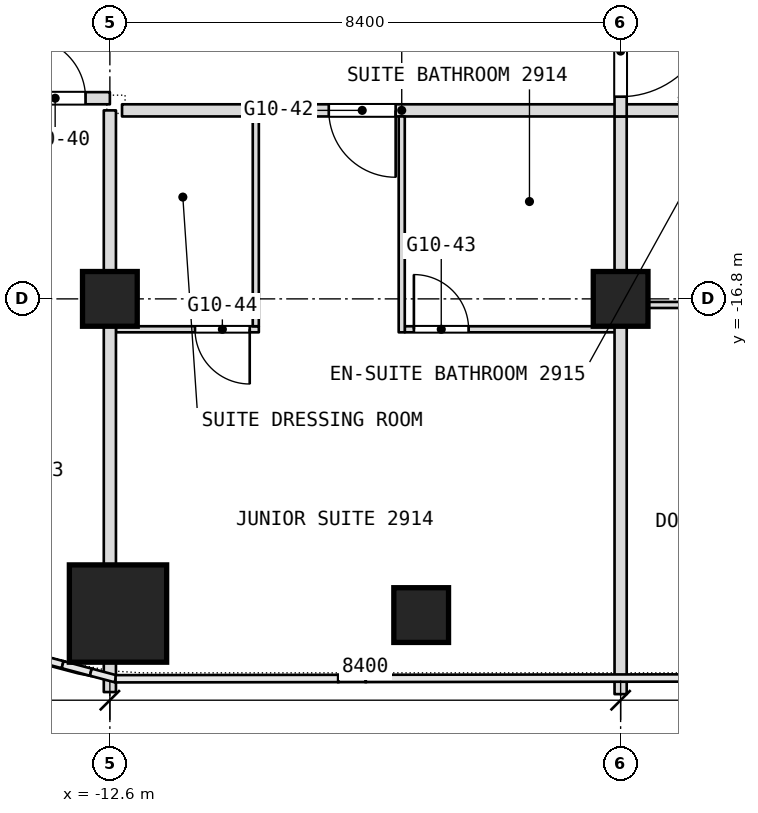
"""IFC4 building model, lengths in metres.
Left out: names, types, materials, properties, quantities, classifications, styles, units other than length and angle.
Written with IfcOpenShell. Run it as: python <this file> out.ifc"""

import sys

from ifc_helpers import new_model, si_unit, direction, frame, frame_2d, origin, origin_2d, place, context, subcontext, project, spatial, rectangle, extrude, element, fill, save


model = new_model("IFC4")
c1 = context("Model", 3, precision=1e-05, world=origin(), true_north=direction((0.0, 1.0)))
c2 = subcontext(c1, "Body", "Model", "MODEL_VIEW")
j1 = project(units=[si_unit("LENGTHUNIT", "METRE"), si_unit("PLANEANGLEUNIT", "RADIAN")], contexts=[c1])
p1 = place(None, origin())
s1 = spatial("IfcSite", under=j1, at=p1, CompositionType="ELEMENT")
p2 = place(p1, origin())
s2 = spatial("IfcBuilding", under=s1, at=p2, CompositionType="ELEMENT")
p3 = place(p2, frame((0.0, 0.0, 130.1)))
s3 = spatial("IfcBuildingStorey", under=s2, at=p3, CompositionType="ELEMENT", Elevation=130.1)
p4 = place(p3, frame((-12.466, -21.975, 0.0), z_axis=(0.0, 0.0, 1.0), x_axis=(1.0, 0.0, 0.0)))
e1 = element("IfcColumn", 1, at=p4, inside=s3, PredefinedType="COLUMN", context=c2, shape_type="SweptSolid", body=[
    extrude(rectangle(XDim=1.6, YDim=1.6, at=origin_2d()), origin(), (0.0, 0.0, 1.0), 3.6),
])
for number, where, z_axis, x_axis in (
    (2, (-12.6, -16.8, 0.0), (0.0, 0.0, 1.0), (1.0, 0.0, 0.0)),
    (3, (-4.2, -16.8, 0.0), (0.0, 0.0, 1.0), (1.0, 0.0, 0.0)),
    (4, (-7.48, -22.0, 0.0), (0.0, 0.0, 1.0), (1.0, 0.0, 0.0)),
):
    element("IfcColumn", number, at=place(p3, frame(where, z_axis=z_axis, x_axis=x_axis)), inside=s3, PredefinedType="COLUMN", context=c2, shape_type="SweptSolid", body=[
        extrude(rectangle(XDim=0.9, YDim=0.9, at=origin_2d()), origin(), (0.0, 0.0, 1.0), 3.6),
    ])
p5 = place(p3, frame((-12.5, -17.3, 0.0), z_axis=(0.0, 0.0, 1.0), x_axis=(1.0, 0.0, 0.0)))
e5 = element("IfcWall", 5, at=p5, inside=s3, PredefinedType="PARTITIONING", context=c2, shape_type="SweptSolid", body=[
    extrude(rectangle(XDim=2.35, YDim=0.1, at=frame_2d((1.175, 0.0))), origin(), (0.0, 0.0, 1.0), 3.34),
])
p6 = place(p5, frame((1.3, 0.0, 0.0)))
e6 = element("IfcOpeningElement", 6, at=p6, cuts=e5, PredefinedType="OPENING", context=c2, shape_type="SweptSolid", body=[
    extrude(rectangle(XDim=0.9, YDim=2.1, at=frame_2d((0.45, 1.05))), frame((0.0, 0.05, 0.0), z_axis=(0.0, -1.0, 0.0), x_axis=(1.0, 0.0, 0.0)), (0.0, 0.0, 1.0), 0.1),
])
p7 = place(p3, frame((-7.75, -17.3, 0.0), z_axis=(0.0, 0.0, 1.0), x_axis=(1.0, 0.0, 0.0)))
e7 = element("IfcWall", 7, at=p7, inside=s3, PredefinedType="PARTITIONING", context=c2, shape_type="SweptSolid", body=[
    extrude(rectangle(XDim=3.65, YDim=0.1, at=frame_2d((1.825, 0.0))), origin(), (0.0, 0.0, 1.0), 3.34),
])
p8 = place(p7, frame((0.15, 0.0, 0.0)))
e8 = element("IfcOpeningElement", 8, at=p8, cuts=e7, PredefinedType="OPENING", context=c2, shape_type="SweptSolid", body=[
    extrude(rectangle(XDim=0.9, YDim=2.1, at=frame_2d((0.45, 1.05))), frame((0.0, 0.05, 0.0), z_axis=(0.0, -1.0, 0.0), x_axis=(1.0, 0.0, 0.0)), (0.0, 0.0, 1.0), 0.1),
])
p9 = place(p3, frame((-4.1, -16.9, 0.0), z_axis=(0.0, 0.0, 1.0), x_axis=(1.0, 0.0, 0.0)))
e9 = element("IfcWall", 9, at=p9, inside=s3, PredefinedType="PARTITIONING", context=c2, shape_type="SweptSolid", body=[
    extrude(rectangle(XDim=2.35, YDim=0.1, at=frame_2d((1.175, 0.0))), origin(), (0.0, 0.0, 1.0), 2.89),
])
p10 = place(p9, frame((1.3, 0.0, 0.0)))
e10 = element("IfcOpeningElement", 10, at=p10, cuts=e9, PredefinedType="OPENING", context=c2, shape_type="SweptSolid", body=[
    extrude(rectangle(XDim=0.9, YDim=2.1, at=frame_2d((0.45, 1.05))), frame((0.0, 0.05, 0.0), z_axis=(0.0, -1.0, 0.0), x_axis=(1.0, 0.0, 0.0)), (0.0, 0.0, 1.0), 0.1),
])
p11 = place(p3, frame((-12.4, -13.7, 0.0), z_axis=(0.0, 0.0, 1.0), x_axis=(1.0, 0.0, 0.0)))
e11 = element("IfcWall", 11, at=p11, inside=s3, PredefinedType="PARTITIONING", context=c2, shape_type="SweptSolid", body=[
    extrude(rectangle(XDim=9.2, YDim=0.2, at=frame_2d((4.6, 0.0))), origin(), (0.0, 0.0, 1.0), 3.34),
])
p12 = place(p11, frame((3.4, 0.0, 0.0)))
e12 = element("IfcOpeningElement", 12, at=p12, cuts=e11, PredefinedType="OPENING", context=c2, shape_type="SweptSolid", body=[
    extrude(rectangle(XDim=1.1, YDim=2.1, at=frame_2d((0.55, 1.05))), frame((0.0, 0.1, 0.0), z_axis=(0.0, -1.0, 0.0), x_axis=(1.0, 0.0, 0.0)), (0.0, 0.0, 1.0), 0.2),
])
p13 = place(p3, frame((-16.7, -13.5, 0.0), z_axis=(0.0, 0.0, 1.0), x_axis=(1.0, 0.0, 0.0)))
e13 = element("IfcWall", 13, at=p13, inside=s3, PredefinedType="PARTITIONING", context=c2, shape_type="SweptSolid", body=[
    extrude(rectangle(XDim=4.1, YDim=0.2, at=frame_2d((2.05, 0.0))), origin(), (0.0, 0.0, 1.0), 3.34),
])
p14 = place(p13, frame((2.7, 0.0, 0.0)))
e14 = element("IfcOpeningElement", 14, at=p14, cuts=e13, PredefinedType="OPENING", context=c2, shape_type="SweptSolid", body=[
    extrude(rectangle(XDim=1.0, YDim=2.1, at=frame_2d((0.5, 1.05))), frame((0.0, 0.1, 0.0), z_axis=(0.0, -1.0, 0.0), x_axis=(1.0, 0.0, 0.0)), (0.0, 0.0, 1.0), 0.2),
])
p15 = place(p3, frame((-4.2, -23.3, 0.0), z_axis=(0.0, 0.0, 1.0), x_axis=(0.0, 1.0, 0.0)))
e15 = element("IfcWall", 15, at=p15, inside=s3, PredefinedType="PARTITIONING", context=c2, shape_type="SweptSolid", body=[
    extrude(rectangle(XDim=9.5, YDim=0.2, at=frame_2d((4.75, 0.0))), origin(), (0.0, 0.0, 1.0), 3.34),
])
p16 = place(p3, frame((-4.2, -13.8, 0.0), z_axis=(0.0, 0.0, 1.0), x_axis=(0.0, 1.0, 0.0)))
e16 = element("IfcWall", 16, at=p16, inside=s3, PredefinedType="PARTITIONING", context=c2, shape_type="SweptSolid", body=[
    extrude(rectangle(XDim=13.8, YDim=0.2, at=frame_2d((6.9, 0.0))), origin(), (0.0, 0.0, 1.0), 3.34),
])
p17 = place(p16, frame((12.15, 0.0, 0.0)))
e17 = element("IfcOpeningElement", 17, at=p17, cuts=e16, PredefinedType="OPENING", context=c2, shape_type="SweptSolid", body=[
    extrude(rectangle(XDim=1.5, YDim=2.1, at=frame_2d((0.75, 1.05))), frame((0.0, 0.1, 0.0), z_axis=(0.0, -1.0, 0.0), x_axis=(1.0, 0.0, 0.0)), (0.0, 0.0, 1.0), 0.2),
])
p18 = place(p16, frame((0.325, 0.0, 0.0)))
e18 = element("IfcOpeningElement", 18, at=p18, cuts=e16, PredefinedType="OPENING", context=c2, shape_type="SweptSolid", body=[
    extrude(rectangle(XDim=1.5, YDim=2.1, at=frame_2d((0.75, 1.05))), frame((0.0, 0.1, 0.0), z_axis=(0.0, -1.0, 0.0), x_axis=(1.0, 0.0, 0.0)), (0.0, 0.0, 1.0), 0.2),
])
p19 = place(p3, frame((-7.8, -17.35, 0.0), z_axis=(0.0, 0.0, 1.0), x_axis=(0.0, 1.0, 0.0)))
e19 = element("IfcWall", 19, at=p19, inside=s3, PredefinedType="PARTITIONING", context=c2, shape_type="SweptSolid", body=[
    extrude(rectangle(XDim=3.55, YDim=0.1, at=frame_2d((1.775, 0.0))), origin(), (0.0, 0.0, 1.0), 3.34),
])
p20 = place(p3, frame((-10.2, -17.25, 0.0), z_axis=(0.0, 0.0, 1.0), x_axis=(0.0, 1.0, 0.0)))
e20 = element("IfcWall", 20, at=p20, inside=s3, PredefinedType="PARTITIONING", context=c2, shape_type="SweptSolid", body=[
    extrude(rectangle(XDim=3.45, YDim=0.1, at=frame_2d((1.725, 0.0))), origin(), (0.0, 0.0, 1.0), 3.34),
])
p21 = place(p3, frame((-12.6, -23.266, 0.0), z_axis=(0.0, 0.0, 1.0), x_axis=(0.0, 1.0, 0.0)))
e21 = element("IfcWall", 21, at=p21, inside=s3, PredefinedType="PARTITIONING", context=c2, shape_type="SweptSolid", body=[
    extrude(rectangle(XDim=0.491, YDim=0.2, at=frame_2d((0.246, 0.0))), origin(), (0.0, 0.0, 1.0), 3.34),
])
p22 = place(p3, frame((-12.6, -21.175, 0.0), z_axis=(0.0, 0.0, 1.0), x_axis=(0.0, 1.0, 0.0)))
e22 = element("IfcWall", 22, at=p22, inside=s3, PredefinedType="PARTITIONING", context=c2, shape_type="SweptSolid", body=[
    extrude(rectangle(XDim=7.475, YDim=0.2, at=frame_2d((3.738, 0.0))), origin(), (0.0, 0.0, 1.0), 3.34),
])
p23 = place(p6, origin())
e23 = element("IfcDoor", 23, at=p23, inside=s3, OperationType="SINGLE_SWING_RIGHT", PredefinedType="DOOR", context=c2, shape_type="SweptSolid", body=[
    extrude(rectangle(XDim=0.9, YDim=2.1, at=frame_2d((0.45, 1.05))), frame((0.0, 0.025, 0.0), z_axis=(0.0, -1.0, 0.0), x_axis=(1.0, 0.0, 0.0)), (0.0, 0.0, 1.0), 0.05),
])
fill(e6, e23)
p24 = place(p8, origin())
e24 = element("IfcDoor", 24, at=p24, inside=s3, OperationType="SINGLE_SWING_LEFT", PredefinedType="DOOR", context=c2, shape_type="SweptSolid", body=[
    extrude(rectangle(XDim=0.9, YDim=2.1, at=frame_2d((0.45, 1.05))), frame((0.0, 0.025, 0.0), z_axis=(0.0, -1.0, 0.0), x_axis=(1.0, 0.0, 0.0)), (0.0, 0.0, 1.0), 0.05),
])
fill(e8, e24)
p25 = place(p12, origin())
e25 = element("IfcDoor", 25, at=p25, inside=s3, OperationType="SINGLE_SWING_LEFT", PredefinedType="DOOR", context=c2, shape_type="SweptSolid", body=[
    extrude(rectangle(XDim=1.1, YDim=2.1, at=frame_2d((0.55, 1.05))), frame((0.0, 0.025, 0.0), z_axis=(0.0, -1.0, 0.0), x_axis=(1.0, 0.0, 0.0)), (0.0, 0.0, 1.0), 0.05),
])
fill(e12, e25)
p26 = place(p14, origin())
e26 = element("IfcDoor", 26, at=p26, inside=s3, OperationType="SINGLE_SWING_RIGHT", PredefinedType="DOOR", context=c2, shape_type="SweptSolid", body=[
    extrude(rectangle(XDim=1.0, YDim=2.1, at=frame_2d((0.5, 1.05))), frame((0.0, 0.025, 0.0), z_axis=(0.0, -1.0, 0.0), x_axis=(1.0, 0.0, 0.0)), (0.0, 0.0, 1.0), 0.05),
])
fill(e14, e26)
p27 = place(p18, origin())
e27 = element("IfcDoor", 27, at=p27, inside=s3, OperationType="DOUBLE_DOOR_DOUBLE_SWING", PredefinedType="DOOR", context=c2, shape_type="SweptSolid", body=[
    extrude(rectangle(XDim=1.5, YDim=2.1, at=frame_2d((0.75, 1.05))), frame((0.0, 0.025, 0.0), z_axis=(0.0, -1.0, 0.0), x_axis=(1.0, 0.0, 0.0)), (0.0, 0.0, 1.0), 0.05),
])
fill(e18, e27)
save(model, sys.argv[1])
